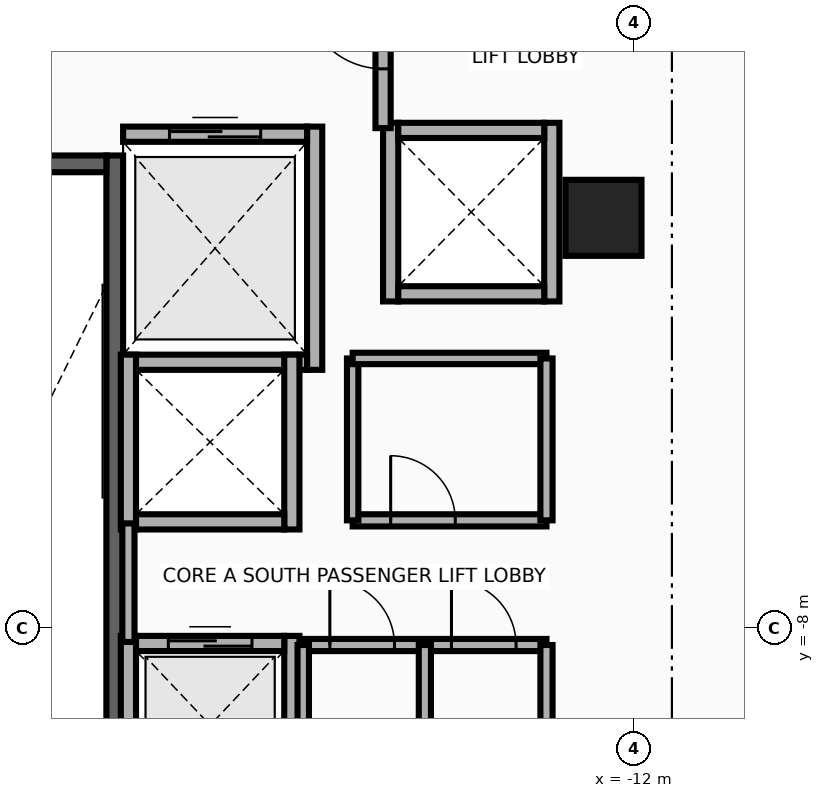
"""IFC4 building model, lengths in metres.
Left out: names, types, materials, properties, quantities, classifications, styles, units other than length and angle.
Written with IfcOpenShell. Run it as: python <this file> out.ifc"""

import sys

from ifc_helpers import new_model, si_unit, direction, frame, frame_2d, origin, origin_2d, place, context, subcontext, project, spatial, rectangle, extrude, source, transform, mapped, element, fill, save


model = new_model("IFC4")
c1 = context("Model", 3, precision=1e-05, world=origin(), true_north=direction((0.0, 1.0)))
c2 = subcontext(c1, "Body", "Model", "MODEL_VIEW")
j1 = project(units=[si_unit("LENGTHUNIT", "METRE"), si_unit("PLANEANGLEUNIT", "RADIAN")], contexts=[c1])
p1 = place(None, origin())
s1 = spatial("IfcSite", under=j1, at=p1, CompositionType="ELEMENT")
p2 = place(p1, origin())
s2 = spatial("IfcBuilding", under=s1, at=p2, CompositionType="ELEMENT")
p3 = place(p2, frame((0.0, 0.0, 192.35)))
s3 = spatial("IfcBuildingStorey", under=s2, at=p3, CompositionType="ELEMENT", Elevation=192.35)
p4 = place(p3, frame((-18.83, -10.525, 0.0), z_axis=(0.0, 0.0, 1.0), x_axis=(0.0, 1.0, 0.0)))
e1 = element("IfcWall", 1, at=p4, inside=s3, PredefinedType="SHEAR", context=c2, shape_type="SweptSolid", body=[
    extrude(rectangle(XDim=8.745, YDim=0.22, at=frame_2d((4.373, 0.0))), origin(), (0.0, 0.0, 1.0), 3.71),
])
p5 = place(p3, frame((-22.05, -1.89, 0.0), z_axis=(0.0, 0.0, 1.0), x_axis=(1.0, 0.0, 0.0)))
e2 = element("IfcWall", 2, at=p5, inside=s3, PredefinedType="SHEAR", context=c2, shape_type="SweptSolid", body=[
    extrude(rectangle(XDim=3.11, YDim=0.22, at=frame_2d((1.555, 0.0))), origin(), (0.0, 0.0, 1.0), 3.71),
])
p6 = place(p5, frame((1.0, 0.0, 0.0)))
e3 = element("IfcOpeningElement", 3, at=p6, cuts=e2, PredefinedType="OPENING", context=c2, shape_type="SweptSolid", body=[
    extrude(rectangle(XDim=1.1, YDim=2.15, at=frame_2d((0.55, 1.075))), frame((0.0, 0.125, 0.0), z_axis=(0.0, -1.0, 0.0), x_axis=(1.0, 0.0, 0.0)), (0.0, 0.0, 1.0), 0.25),
])
m1 = source(origin(), c2, "Body", "SweptSolid", [
    extrude(rectangle(XDim=1.0, YDim=1.0, at=origin_2d()), origin(), (0.0, 0.0, 1.0), 3.95),
])
p7 = place(p3, frame((-12.4, -2.6, 0.0), z_axis=(0.0, 0.0, 1.0), x_axis=(1.0, 0.0, 0.0)))
e4 = element("IfcColumn", 4, at=p7, inside=s3, PredefinedType="COLUMN", context=c2, shape_type="MappedRepresentation", body=[
    mapped(m1, transform((0.0, 0.0, 0.0), x_axis=(1.0, 0.0, 0.0), y_axis=(0.0, 1.0, 0.0), z_axis=(0.0, 0.0, 1.0), scale=1.0)),
])
p8 = place(p3, frame((-16.2, -4.6, 0.0), z_axis=(0.0, 0.0, 1.0), x_axis=(0.0, 1.0, 0.0)))
e5 = element("IfcWall", 5, at=p8, inside=s3, PredefinedType="MOVABLE", context=c2, shape_type="SweptSolid", body=[
    extrude(rectangle(XDim=3.2, YDim=0.2, at=frame_2d((1.6, 0.0))), origin(), (0.0, 0.0, 1.0), 3.71),
])
p9 = place(p3, frame((-18.72, -4.5, 0.0), z_axis=(0.0, 0.0, 1.0), x_axis=(1.0, 0.0, 0.0)))
e6 = element("IfcWall", 6, at=p9, inside=s3, PredefinedType="MOVABLE", context=c2, shape_type="SweptSolid", body=[
    extrude(rectangle(XDim=2.42, YDim=0.2, at=frame_2d((1.21, 0.0))), origin(), (0.0, 0.0, 1.0), 3.71),
])
p10 = place(p3, frame((-18.72, -1.5, 0.0), z_axis=(0.0, 0.0, 1.0), x_axis=(1.0, 0.0, 0.0)))
e7 = element("IfcWall", 7, at=p10, inside=s3, PredefinedType="MOVABLE", context=c2, shape_type="SweptSolid", body=[
    extrude(rectangle(XDim=2.42, YDim=0.2, at=frame_2d((1.21, 0.0))), origin(), (0.0, 0.0, 1.0), 3.71),
])
p11 = place(p10, frame((0.61, 0.0, 0.0)))
e8 = element("IfcOpeningElement", 8, at=p11, cuts=e7, PredefinedType="OPENING", context=c2, shape_type="SweptSolid", body=[
    extrude(rectangle(XDim=1.2, YDim=2.1, at=frame_2d((0.6, 1.05))), frame((0.0, 0.115, 0.0), z_axis=(0.0, -1.0, 0.0), x_axis=(1.0, 0.0, 0.0)), (0.0, 0.0, 1.0), 0.23),
])
for number, where, z_axis, x_axis in (
    (9, (-18.65, -10.45, 0.0), (0.0, 0.0, 1.0), (0.0, 1.0, 0.0)),
    (10, (-16.5, -10.45, 0.0), (0.0, 0.0, 1.0), (0.0, 1.0, 0.0)),
):
    element("IfcWall", number, at=place(p3, frame(where, z_axis=z_axis, x_axis=x_axis)), inside=s3, PredefinedType="MOVABLE", context=c2, shape_type="SweptSolid", body=[
        extrude(rectangle(XDim=2.35, YDim=0.2, at=frame_2d((1.175, 0.0))), origin(), (0.0, 0.0, 1.0), 2.994),
    ])
p12 = place(p3, frame((-18.55, -8.2, 0.0), z_axis=(0.0, 0.0, 1.0), x_axis=(1.0, 0.0, 0.0)))
e11 = element("IfcWall", 11, at=p12, inside=s3, PredefinedType="MOVABLE", context=c2, shape_type="SweptSolid", body=[
    extrude(rectangle(XDim=1.95, YDim=0.2, at=frame_2d((0.975, 0.0))), origin(), (0.0, 0.0, 1.0), 3.71),
])
p13 = place(p12, frame((0.425, 0.0, 0.0)))
e12 = element("IfcOpeningElement", 12, at=p13, cuts=e11, PredefinedType="OPENING", context=c2, shape_type="SweptSolid", body=[
    extrude(rectangle(XDim=1.1, YDim=2.1, at=frame_2d((0.55, 1.05))), frame((0.0, 0.115, 0.0), z_axis=(0.0, -1.0, 0.0), x_axis=(1.0, 0.0, 0.0)), (0.0, 0.0, 1.0), 0.23),
])
for number, where, z_axis, x_axis in (
    (13, (-18.65, -6.7, 0.0), (0.0, 0.0, 1.0), (0.0, 1.0, 0.0)),
    (14, (-16.5, -6.7, 0.0), (0.0, 0.0, 1.0), (0.0, 1.0, 0.0)),
):
    element("IfcWall", number, at=place(p3, frame(where, z_axis=z_axis, x_axis=x_axis)), inside=s3, PredefinedType="MOVABLE", context=c2, shape_type="SweptSolid", body=[
        extrude(rectangle(XDim=2.3, YDim=0.2, at=frame_2d((1.15, 0.0))), origin(), (0.0, 0.0, 1.0), 3.71),
    ])
p14 = place(p3, frame((-18.55, -6.6, 0.0), z_axis=(0.0, 0.0, 1.0), x_axis=(1.0, 0.0, 0.0)))
e15 = element("IfcWall", 15, at=p14, inside=s3, PredefinedType="MOVABLE", context=c2, shape_type="SweptSolid", body=[
    extrude(rectangle(XDim=1.95, YDim=0.2, at=frame_2d((0.975, 0.0))), origin(), (0.0, 0.0, 1.0), 3.71),
])
for number, where, z_axis, x_axis in (
    (16, (-15.2, -3.7, 0.0), (0.0, 0.0, 1.0), (0.0, 1.0, 0.0)),
    (17, (-13.08, -3.7, 0.0), (0.0, 0.0, 1.0), (0.0, 1.0, 0.0)),
):
    element("IfcWall", number, at=place(p3, frame(where, z_axis=z_axis, x_axis=x_axis)), inside=s3, PredefinedType="MOVABLE", context=c2, shape_type="SweptSolid", body=[
        extrude(rectangle(XDim=2.35, YDim=0.2, at=frame_2d((1.175, 0.0))), origin(), (0.0, 0.0, 1.0), 3.71),
    ])
for number, where, z_axis, x_axis in (
    (18, (-15.1, -3.6, 0.0), (0.0, 0.0, 1.0), (1.0, 0.0, 0.0)),
    (19, (-15.1, -1.45, 0.0), (0.0, 0.0, 1.0), (1.0, 0.0, 0.0)),
):
    element("IfcWall", number, at=place(p3, frame(where, z_axis=z_axis, x_axis=x_axis)), inside=s3, PredefinedType="MOVABLE", context=c2, shape_type="SweptSolid", body=[
        extrude(rectangle(XDim=1.92, YDim=0.2, at=frame_2d((0.96, 0.0))), origin(), (0.0, 0.0, 1.0), 3.71),
    ])
p15 = place(p3, frame((-15.3, -1.42, 0.0), z_axis=(0.0, 0.0, 1.0), x_axis=(0.0, 1.0, 0.0)))
e20 = element("IfcWall", 20, at=p15, inside=s3, PredefinedType="PARTITIONING", context=c2, shape_type="SweptSolid", body=[
    extrude(rectangle(XDim=2.67, YDim=0.2, at=frame_2d((1.335, 0.0))), origin(), (0.0, 0.0, 1.0), 3.71),
])
p16 = place(p15, frame((0.78, 0.0, 0.0)))
e21 = element("IfcOpeningElement", 21, at=p16, cuts=e20, PredefinedType="OPENING", context=c2, shape_type="SweptSolid", body=[
    extrude(rectangle(XDim=1.05, YDim=2.15, at=frame_2d((0.525, 1.075))), frame((0.0, 0.115, 0.0), z_axis=(0.0, -1.0, 0.0), x_axis=(1.0, 0.0, 0.0)), (0.0, 0.0, 1.0), 0.23),
])
p17 = place(p3, frame((-18.65, -8.18, 0.0), z_axis=(0.0, 0.0, 1.0), x_axis=(0.0, 1.0, 0.0)))
e22 = element("IfcWall", 22, at=p17, inside=s3, PredefinedType="PARTITIONING", context=c2, shape_type="SweptSolid", body=[
    extrude(rectangle(XDim=1.56, YDim=0.16, at=frame_2d((0.78, 0.0))), origin(), (0.0, 0.0, 1.0), 3.71),
])
p18 = place(p3, frame((-16.35, -8.22, 0.0), z_axis=(0.0, 0.0, 1.0), x_axis=(1.0, 0.0, 0.0)))
e23 = element("IfcWall", 23, at=p18, inside=s3, PredefinedType="PARTITIONING", context=c2, shape_type="SweptSolid", body=[
    extrude(rectangle(XDim=3.2, YDim=0.16, at=frame_2d((1.6, 0.0))), origin(), (0.0, 0.0, 1.0), 3.71),
])
p19 = place(p18, frame((0.35, 0.0, 0.0)))
e24 = element("IfcOpeningElement", 24, at=p19, cuts=e23, PredefinedType="OPENING", context=c2, shape_type="SweptSolid", body=[
    extrude(rectangle(XDim=0.85, YDim=2.05, at=frame_2d((0.425, 1.025))), frame((0.0, 0.095, 0.0), z_axis=(0.0, -1.0, 0.0), x_axis=(1.0, 0.0, 0.0)), (0.0, 0.0, 1.0), 0.19),
])
p20 = place(p18, frame((1.95, 0.0, 0.0)))
e25 = element("IfcOpeningElement", 25, at=p20, cuts=e23, PredefinedType="OPENING", context=c2, shape_type="SweptSolid", body=[
    extrude(rectangle(XDim=0.85, YDim=2.05, at=frame_2d((0.425, 1.025))), frame((0.0, 0.095, 0.0), z_axis=(0.0, -1.0, 0.0), x_axis=(1.0, 0.0, 0.0)), (0.0, 0.0, 1.0), 0.19),
])
p21 = place(p3, frame((-16.35, -10.35, 0.0), z_axis=(0.0, 0.0, 1.0), x_axis=(0.0, 1.0, 0.0)))
e26 = element("IfcWall", 26, at=p21, inside=s3, PredefinedType="PARTITIONING", context=c2, shape_type="SweptSolid", body=[
    extrude(rectangle(XDim=2.13, YDim=0.15, at=frame_2d((1.065, 0.0))), origin(), (0.0, 0.0, 1.0), 3.71),
])
for number, where, z_axis, x_axis in (
    (27, (-13.15, -10.35, 0.0), (0.0, 0.0, 1.0), (0.0, 1.0, 0.0)),
    (28, (-14.75, -10.35, 0.0), (0.0, 0.0, 1.0), (0.0, 1.0, 0.0)),
):
    element("IfcWall", number, at=place(p3, frame(where, z_axis=z_axis, x_axis=x_axis)), inside=s3, PredefinedType="PARTITIONING", context=c2, shape_type="SweptSolid", body=[
        extrude(rectangle(XDim=2.13, YDim=0.16, at=frame_2d((1.065, 0.0))), origin(), (0.0, 0.0, 1.0), 3.71),
    ])
p22 = place(p3, frame((-15.7, -6.58, 0.0), z_axis=(0.0, 0.0, 1.0), x_axis=(1.0, 0.0, 0.0)))
e29 = element("IfcWall", 29, at=p22, inside=s3, PredefinedType="PARTITIONING", context=c2, shape_type="SweptSolid", body=[
    extrude(rectangle(XDim=2.55, YDim=0.16, at=frame_2d((1.275, 0.0))), origin(), (0.0, 0.0, 1.0), 3.71),
])
p23 = place(p22, frame((0.5, 0.0, 0.0)))
e30 = element("IfcOpeningElement", 30, at=p23, cuts=e29, PredefinedType="OPENING", context=c2, shape_type="SweptSolid", body=[
    extrude(rectangle(XDim=0.85, YDim=2.05, at=frame_2d((0.425, 1.025))), frame((0.0, 0.095, 0.0), z_axis=(0.0, -1.0, 0.0), x_axis=(1.0, 0.0, 0.0)), (0.0, 0.0, 1.0), 0.19),
])
p24 = place(p3, frame((-15.7, -6.58, 0.0), z_axis=(0.0, 0.0, 1.0), x_axis=(0.0, 1.0, 0.0)))
e31 = element("IfcWall", 31, at=p24, inside=s3, PredefinedType="PARTITIONING", context=c2, shape_type="SweptSolid", body=[
    extrude(rectangle(XDim=2.13, YDim=0.15, at=frame_2d((1.065, 0.0))), origin(), (0.0, 0.0, 1.0), 3.71),
])
p25 = place(p3, frame((-15.7, -4.45, 0.0), z_axis=(0.0, 0.0, 1.0), x_axis=(1.0, 0.0, 0.0)))
e32 = element("IfcWall", 32, at=p25, inside=s3, PredefinedType="PARTITIONING", context=c2, shape_type="SweptSolid", body=[
    extrude(rectangle(XDim=2.55, YDim=0.15, at=frame_2d((1.275, 0.0))), origin(), (0.0, 0.0, 1.0), 3.71),
])
p26 = place(p3, frame((-13.15, -6.58, 0.0), z_axis=(0.0, 0.0, 1.0), x_axis=(0.0, 1.0, 0.0)))
e33 = element("IfcWall", 33, at=p26, inside=s3, PredefinedType="PARTITIONING", context=c2, shape_type="SweptSolid", body=[
    extrude(rectangle(XDim=2.13, YDim=0.16, at=frame_2d((1.065, 0.0))), origin(), (0.0, 0.0, 1.0), 3.71),
])
p27 = place(p11, origin())
e34 = element("IfcDoor", 34, at=p27, inside=s3, OperationType="DOUBLE_DOOR_SLIDING", PredefinedType="DOOR", context=c2, shape_type="SweptSolid", body=[
    extrude(rectangle(XDim=1.2, YDim=2.1, at=frame_2d((0.6, 1.05))), frame((0.0, 0.025, 0.0), z_axis=(0.0, -1.0, 0.0), x_axis=(1.0, 0.0, 0.0)), (0.0, 0.0, 1.0), 0.05),
])
fill(e8, e34)
p28 = place(p13, origin())
e35 = element("IfcDoor", 35, at=p28, inside=s3, OperationType="DOUBLE_DOOR_SLIDING", PredefinedType="DOOR", context=c2, shape_type="SweptSolid", body=[
    extrude(rectangle(XDim=1.1, YDim=2.1, at=frame_2d((0.55, 1.05))), frame((0.0, 0.025, 0.0), z_axis=(0.0, -1.0, 0.0), x_axis=(1.0, 0.0, 0.0)), (0.0, 0.0, 1.0), 0.05),
])
fill(e12, e35)
p29 = place(p16, origin())
e36 = element("IfcDoor", 36, at=p29, inside=s3, OperationType="SINGLE_SWING_RIGHT", PredefinedType="DOOR", context=c2, shape_type="SweptSolid", body=[
    extrude(rectangle(XDim=1.05, YDim=2.15, at=frame_2d((0.525, 1.075))), frame((0.0, 0.025, 0.0), z_axis=(0.0, -1.0, 0.0), x_axis=(1.0, 0.0, 0.0)), (0.0, 0.0, 1.0), 0.05),
])
fill(e21, e36)
p30 = place(p19, origin())
e37 = element("IfcDoor", 37, at=p30, inside=s3, OperationType="SINGLE_SWING_RIGHT", PredefinedType="DOOR", context=c2, shape_type="SweptSolid", body=[
    extrude(rectangle(XDim=0.85, YDim=2.05, at=frame_2d((0.425, 1.025))), frame((0.0, 0.025, 0.0), z_axis=(0.0, -1.0, 0.0), x_axis=(1.0, 0.0, 0.0)), (0.0, 0.0, 1.0), 0.05),
])
fill(e24, e37)
p31 = place(p20, origin())
e38 = element("IfcDoor", 38, at=p31, inside=s3, OperationType="SINGLE_SWING_LEFT", PredefinedType="DOOR", context=c2, shape_type="SweptSolid", body=[
    extrude(rectangle(XDim=0.85, YDim=2.05, at=frame_2d((0.425, 1.025))), frame((0.0, 0.025, 0.0), z_axis=(0.0, -1.0, 0.0), x_axis=(1.0, 0.0, 0.0)), (0.0, 0.0, 1.0), 0.05),
])
fill(e25, e38)
p32 = place(p23, origin())
e39 = element("IfcDoor", 39, at=p32, inside=s3, OperationType="SINGLE_SWING_RIGHT", PredefinedType="DOOR", context=c2, shape_type="SweptSolid", body=[
    extrude(rectangle(XDim=0.85, YDim=2.05, at=frame_2d((0.425, 1.025))), frame((0.0, 0.025, 0.0), z_axis=(0.0, -1.0, 0.0), x_axis=(1.0, 0.0, 0.0)), (0.0, 0.0, 1.0), 0.05),
])
fill(e30, e39)
save(model, sys.argv[1])
